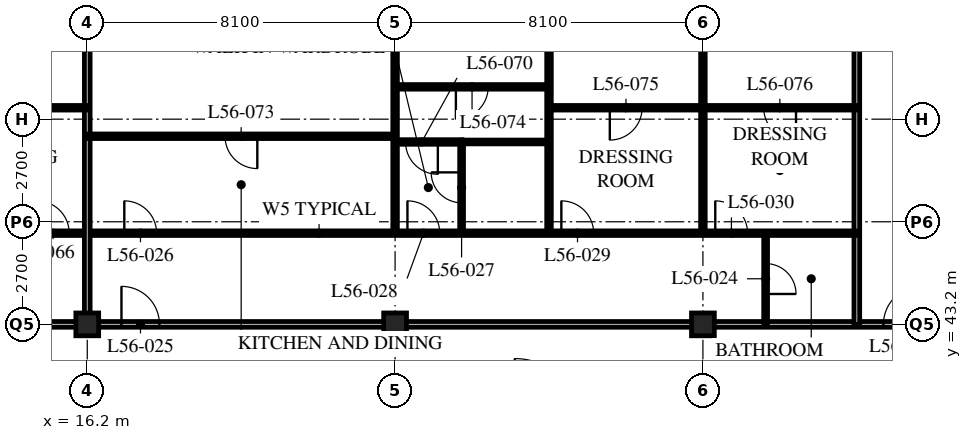
"""IFC4 building model, lengths in metres.
Left out: names, types, materials, properties, quantities, classifications, styles, units other than length and angle.
Written with IfcOpenShell. Run it as: python <this file> out.ifc"""

import sys

from ifc_helpers import new_model, si_unit, direction, frame, frame_2d, origin, origin_2d, place, context, subcontext, project, spatial, rectangle, hollow_rectangle, extrude, element, fill, save


model = new_model("IFC4")
c1 = context("Model", 3, precision=1e-05, world=origin(), true_north=direction((0.0, 1.0)))
c2 = subcontext(c1, "Body", "Model", "MODEL_VIEW")
j1 = project(units=[si_unit("LENGTHUNIT", "METRE"), si_unit("PLANEANGLEUNIT", "RADIAN")], contexts=[c1])
p1 = place(None, origin())
s1 = spatial("IfcSite", under=j1, at=p1, CompositionType="ELEMENT")
p2 = place(p1, origin())
s2 = spatial("IfcBuilding", under=s1, at=p2, CompositionType="ELEMENT")
p3 = place(p2, frame((0.0, 0.0, 217.2)))
s3 = spatial("IfcBuildingStorey", under=s2, at=p3, CompositionType="ELEMENT", Elevation=217.2)
for number, where, z_axis, x_axis in (
    (1, (16.2, 43.2, 0.0), (0.0, 0.0, 1.0), (1.0, 0.0, 0.0)),
    (2, (24.3, 43.2, 0.0), (0.0, 0.0, 1.0), (1.0, 0.0, 0.0)),
    (3, (32.4, 43.2, 0.0), (0.0, 0.0, 1.0), (1.0, 0.0, 0.0)),
):
    element("IfcColumn", number, at=place(p3, frame(where, z_axis=z_axis, x_axis=x_axis)), inside=s3, PredefinedType="COLUMN", context=c2, shape_type="SweptSolid", body=[
        extrude(hollow_rectangle(XDim=0.6, YDim=0.6, WallThickness=0.05, at=origin_2d()), origin(), (0.0, 0.0, 1.0), 3.6),
    ])
p4 = place(p3, frame((12.15, 43.2, 0.0), z_axis=(0.0, 0.0, 1.0), x_axis=(1.0, 0.0, 0.0)))
e4 = element("IfcWall", 4, at=p4, inside=s3, PredefinedType="PARTITIONING", context=c2, shape_type="SweptSolid", body=[
    extrude(rectangle(XDim=36.45, YDim=0.15, at=frame_2d((18.225, 0.0))), origin(), (0.0, 0.0, 1.0), 2.778),
])
p5 = place(p4, frame((4.95, 0.0, 0.0)))
e5 = element("IfcOpeningElement", 5, at=p5, cuts=e4, PredefinedType="OPENING", context=c2, shape_type="SweptSolid", body=[
    extrude(rectangle(XDim=1.0, YDim=2.1, at=frame_2d((0.5, 1.05))), frame((0.0, 0.085, 0.0), z_axis=(0.0, -1.0, 0.0), x_axis=(1.0, 0.0, 0.0)), (0.0, 0.0, 1.0), 0.17),
])
p6 = place(p4, frame((25.0, 0.0, 0.0)))
e6 = element("IfcOpeningElement", 6, at=p6, cuts=e4, PredefinedType="OPENING", context=c2, shape_type="SweptSolid", body=[
    extrude(rectangle(XDim=1.0, YDim=2.1, at=frame_2d((0.5, 1.05))), frame((0.0, 0.085, 0.0), z_axis=(0.0, -1.0, 0.0), x_axis=(1.0, 0.0, 0.0)), (0.0, 0.0, 1.0), 0.17),
])
p7 = place(p4, frame((30.7, 0.0, 0.0)))
e7 = element("IfcOpeningElement", 7, at=p7, cuts=e4, PredefinedType="OPENING", context=c2, shape_type="SweptSolid", body=[
    extrude(rectangle(XDim=1.0, YDim=2.1, at=frame_2d((0.5, 1.05))), frame((0.0, 0.085, 0.0), z_axis=(0.0, -1.0, 0.0), x_axis=(1.0, 0.0, 0.0)), (0.0, 0.0, 1.0), 0.17),
])
p8 = place(p4, frame((33.925, 0.0, 0.0)))
e8 = element("IfcOpeningElement", 8, at=p8, cuts=e4, PredefinedType="OPENING", context=c2, shape_type="SweptSolid", body=[
    extrude(rectangle(XDim=1.0, YDim=2.1, at=frame_2d((0.5, 1.05))), frame((0.0, 0.085, 0.0), z_axis=(0.0, -1.0, 0.0), x_axis=(1.0, 0.0, 0.0)), (0.0, 0.0, 1.0), 0.17),
])
p9 = place(p4, frame((1.525, 0.0, 0.0)))
e9 = element("IfcOpeningElement", 9, at=p9, cuts=e4, PredefinedType="OPENING", context=c2, shape_type="SweptSolid", body=[
    extrude(rectangle(XDim=1.0, YDim=2.1, at=frame_2d((0.5, 1.05))), frame((0.0, 0.085, 0.0), z_axis=(0.0, -1.0, 0.0), x_axis=(1.0, 0.0, 0.0)), (0.0, 0.0, 1.0), 0.17),
])
p10 = place(p3, frame((34.05, 43.2, 0.0), z_axis=(0.0, 0.0, 1.0), x_axis=(0.0, 1.0, 0.0)))
e10 = element("IfcWall", 10, at=p10, inside=s3, PredefinedType="PARTITIONING", context=c2, shape_type="SweptSolid", body=[
    extrude(rectangle(XDim=2.4, YDim=0.1, at=frame_2d((1.2, 0.0))), origin(), (0.0, 0.0, 1.0), 3.39),
])
p11 = place(p10, frame((0.8, 0.0, 0.0)))
e11 = element("IfcOpeningElement", 11, at=p11, cuts=e10, PredefinedType="OPENING", context=c2, shape_type="SweptSolid", body=[
    extrude(rectangle(XDim=0.8, YDim=2.1, at=frame_2d((0.4, 1.05))), frame((0.0, 0.06, 0.0), z_axis=(0.0, -1.0, 0.0), x_axis=(1.0, 0.0, 0.0)), (0.0, 0.0, 1.0), 0.12),
])
p12 = place(p3, frame((26.05, 45.6, 0.0), z_axis=(0.0, 0.0, 1.0), x_axis=(0.0, 1.0, 0.0)))
e12 = element("IfcWall", 12, at=p12, inside=s3, PredefinedType="PARTITIONING", context=c2, shape_type="SweptSolid", body=[
    extrude(rectangle(XDim=2.4, YDim=0.1, at=frame_2d((1.2, 0.0))), origin(), (0.0, 0.0, 1.0), 3.39),
])
p13 = place(p12, frame((0.8, 0.0, 0.0)))
e13 = element("IfcOpeningElement", 13, at=p13, cuts=e12, PredefinedType="OPENING", context=c2, shape_type="SweptSolid", body=[
    extrude(rectangle(XDim=0.8, YDim=2.1, at=frame_2d((0.4, 1.05))), frame((0.0, 0.06, 0.0), z_axis=(0.0, -1.0, 0.0), x_axis=(1.0, 0.0, 0.0)), (0.0, 0.0, 1.0), 0.12),
])
p14 = place(p3, frame((26.05, 48.0, 0.0), z_axis=(0.0, 0.0, 1.0), x_axis=(1.0, 0.0, 0.0)))
e14 = element("IfcWall", 14, at=p14, inside=s3, PredefinedType="PARTITIONING", context=c2, shape_type="SweptSolid", body=[
    extrude(rectangle(XDim=2.3, YDim=0.1, at=frame_2d((1.15, 0.0))), origin(), (0.0, 0.0, 1.0), 3.39),
])
p15 = place(p3, frame((24.3, 45.6, 0.0), z_axis=(0.0, 0.0, 1.0), x_axis=(0.0, 1.0, 0.0)))
e15 = element("IfcWall", 15, at=p15, inside=s3, PredefinedType="PARTITIONING", context=c2, shape_type="SweptSolid", body=[
    extrude(rectangle(XDim=13.5, YDim=0.12, at=frame_2d((6.75, 0.0))), origin(), (0.0, 0.0, 1.0), 2.778),
])
p16 = place(p3, frame((28.35, 45.6, 0.0), z_axis=(0.0, 0.0, 1.0), x_axis=(0.0, 1.0, 0.0)))
e16 = element("IfcWall", 16, at=p16, inside=s3, PredefinedType="PARTITIONING", context=c2, shape_type="SweptSolid", body=[
    extrude(rectangle(XDim=13.5, YDim=0.12, at=frame_2d((6.75, 0.0))), origin(), (0.0, 0.0, 1.0), 3.39),
])
p17 = place(p3, frame((32.4, 45.6, 0.0), z_axis=(0.0, 0.0, 1.0), x_axis=(0.0, 1.0, 0.0)))
e17 = element("IfcWall", 17, at=p17, inside=s3, PredefinedType="PARTITIONING", context=c2, shape_type="SweptSolid", body=[
    extrude(rectangle(XDim=13.5, YDim=0.12, at=frame_2d((6.75, 0.0))), origin(), (0.0, 0.0, 1.0), 2.778),
])
p18 = place(p3, frame((36.45, 43.2, 0.0), z_axis=(0.0, 0.0, 1.0), x_axis=(0.0, 1.0, 0.0)))
e18 = element("IfcWall", 18, at=p18, inside=s3, PredefinedType="PARTITIONING", context=c2, shape_type="SweptSolid", body=[
    extrude(rectangle(XDim=15.9, YDim=0.15, at=frame_2d((7.95, 0.0))), origin(), (0.0, 0.0, 1.0), 3.39),
])
p19 = place(p3, frame((8.15, 45.6, 0.0), z_axis=(0.0, 0.0, 1.0), x_axis=(1.0, 0.0, 0.0)))
e19 = element("IfcWall", 19, at=p19, inside=s3, PredefinedType="PARTITIONING", context=c2, shape_type="SweptSolid", body=[
    extrude(rectangle(XDim=28.3, YDim=0.12, at=frame_2d((14.15, 0.0))), origin(), (0.0, 0.0, 1.0), 3.39),
])
p20 = place(p19, frame((9.025, 0.0, 0.0)))
e20 = element("IfcOpeningElement", 20, at=p20, cuts=e19, PredefinedType="OPENING", context=c2, shape_type="SweptSolid", body=[
    extrude(rectangle(XDim=0.85, YDim=2.1, at=frame_2d((0.425, 1.05))), frame((0.0, 0.07, 0.0), z_axis=(0.0, -1.0, 0.0), x_axis=(1.0, 0.0, 0.0)), (0.0, 0.0, 1.0), 0.14),
])
p21 = place(p19, frame((16.475, 0.0, 0.0)))
e21 = element("IfcOpeningElement", 21, at=p21, cuts=e19, PredefinedType="OPENING", context=c2, shape_type="SweptSolid", body=[
    extrude(rectangle(XDim=0.85, YDim=2.1, at=frame_2d((0.425, 1.05))), frame((0.0, 0.07, 0.0), z_axis=(0.0, -1.0, 0.0), x_axis=(1.0, 0.0, 0.0)), (0.0, 0.0, 1.0), 0.14),
])
p22 = place(p19, frame((20.525, 0.0, 0.0)))
e22 = element("IfcOpeningElement", 22, at=p22, cuts=e19, PredefinedType="OPENING", context=c2, shape_type="SweptSolid", body=[
    extrude(rectangle(XDim=0.85, YDim=2.1, at=frame_2d((0.425, 1.05))), frame((0.0, 0.07, 0.0), z_axis=(0.0, -1.0, 0.0), x_axis=(1.0, 0.0, 0.0)), (0.0, 0.0, 1.0), 0.14),
])
p23 = place(p19, frame((24.575, 0.0, 0.0)))
e23 = element("IfcOpeningElement", 23, at=p23, cuts=e19, PredefinedType="OPENING", context=c2, shape_type="SweptSolid", body=[
    extrude(rectangle(XDim=0.85, YDim=2.1, at=frame_2d((0.425, 1.05))), frame((0.0, 0.07, 0.0), z_axis=(0.0, -1.0, 0.0), x_axis=(1.0, 0.0, 0.0)), (0.0, 0.0, 1.0), 0.14),
])
p24 = place(p19, frame((6.725, 0.0, 0.0)))
e24 = element("IfcOpeningElement", 24, at=p24, cuts=e19, PredefinedType="OPENING", context=c2, shape_type="SweptSolid", body=[
    extrude(rectangle(XDim=0.85, YDim=2.1, at=frame_2d((0.425, 1.05))), frame((0.0, 0.07, 0.0), z_axis=(0.0, -1.0, 0.0), x_axis=(1.0, 0.0, 0.0)), (0.0, 0.0, 1.0), 0.14),
])
p25 = place(p19, frame((2.875, 0.0, 0.0)))
e25 = element("IfcOpeningElement", 25, at=p25, cuts=e19, PredefinedType="OPENING", context=c2, shape_type="SweptSolid", body=[
    extrude(rectangle(XDim=0.85, YDim=2.1, at=frame_2d((0.425, 1.05))), frame((0.0, 0.07, 0.0), z_axis=(0.0, -1.0, 0.0), x_axis=(1.0, 0.0, 0.0)), (0.0, 0.0, 1.0), 0.14),
])
p26 = place(p3, frame((16.2, 43.2, 0.0), z_axis=(0.0, 0.0, 1.0), x_axis=(0.0, 1.0, 0.0)))
e26 = element("IfcWall", 26, at=p26, inside=s3, PredefinedType="PARTITIONING", context=c2, shape_type="SweptSolid", body=[
    extrude(rectangle(XDim=15.9, YDim=0.15, at=frame_2d((7.95, 0.0))), origin(), (0.0, 0.0, 1.0), 2.778),
])
p27 = place(p3, frame((24.3, 48.0, 0.0), z_axis=(0.0, 0.0, 1.0), x_axis=(1.0, 0.0, 0.0)))
e27 = element("IfcWall", 27, at=p27, inside=s3, PredefinedType="PARTITIONING", context=c2, shape_type="SweptSolid", body=[
    extrude(rectangle(XDim=1.76, YDim=0.12, at=frame_2d((0.88, 0.0))), origin(), (0.0, 0.0, 1.0), 3.39),
])
p28 = place(p27, frame((0.275, 0.0, 0.0)))
e28 = element("IfcOpeningElement", 28, at=p28, cuts=e27, PredefinedType="OPENING", context=c2, shape_type="SweptSolid", body=[
    extrude(rectangle(XDim=0.85, YDim=2.1, at=frame_2d((0.425, 1.05))), frame((0.0, 0.07, 0.0), z_axis=(0.0, -1.0, 0.0), x_axis=(1.0, 0.0, 0.0)), (0.0, 0.0, 1.0), 0.14),
])
p29 = place(p3, frame((16.2, 48.15, 0.0), z_axis=(0.0, 0.0, 1.0), x_axis=(1.0, 0.0, 0.0)))
e29 = element("IfcWall", 29, at=p29, inside=s3, PredefinedType="PARTITIONING", context=c2, shape_type="SweptSolid", body=[
    extrude(rectangle(XDim=8.1, YDim=0.12, at=frame_2d((4.05, 0.0))), origin(), (0.0, 0.0, 1.0), 3.39),
])
p30 = place(p29, frame((3.625, 0.0, 0.0)))
e30 = element("IfcOpeningElement", 30, at=p30, cuts=e29, PredefinedType="OPENING", context=c2, shape_type="SweptSolid", body=[
    extrude(rectangle(XDim=0.85, YDim=2.1, at=frame_2d((0.425, 1.05))), frame((0.0, 0.07, 0.0), z_axis=(0.0, -1.0, 0.0), x_axis=(1.0, 0.0, 0.0)), (0.0, 0.0, 1.0), 0.14),
])
p31 = place(p3, frame((24.3, 49.45, 0.0), z_axis=(0.0, 0.0, 1.0), x_axis=(1.0, 0.0, 0.0)))
e31 = element("IfcWall", 31, at=p31, inside=s3, PredefinedType="PARTITIONING", context=c2, shape_type="SweptSolid", body=[
    extrude(rectangle(XDim=4.05, YDim=0.12, at=frame_2d((2.025, 0.0))), origin(), (0.0, 0.0, 1.0), 3.39),
])
p32 = place(p31, frame((1.6, 0.0, 0.0)))
e32 = element("IfcOpeningElement", 32, at=p32, cuts=e31, PredefinedType="OPENING", context=c2, shape_type="SweptSolid", body=[
    extrude(rectangle(XDim=0.85, YDim=2.1, at=frame_2d((0.425, 1.05))), frame((0.0, 0.07, 0.0), z_axis=(0.0, -1.0, 0.0), x_axis=(1.0, 0.0, 0.0)), (0.0, 0.0, 1.0), 0.14),
])
p33 = place(p3, frame((28.35, 48.9, 0.0), z_axis=(0.0, 0.0, 1.0), x_axis=(1.0, 0.0, 0.0)))
e33 = element("IfcWall", 33, at=p33, inside=s3, PredefinedType="PARTITIONING", context=c2, shape_type="SweptSolid", body=[
    extrude(rectangle(XDim=8.1, YDim=0.12, at=frame_2d((4.05, 0.0))), origin(), (0.0, 0.0, 1.0), 3.39),
])
p34 = place(p33, frame((1.6, 0.0, 0.0)))
e34 = element("IfcOpeningElement", 34, at=p34, cuts=e33, PredefinedType="OPENING", context=c2, shape_type="SweptSolid", body=[
    extrude(rectangle(XDim=0.85, YDim=2.1, at=frame_2d((0.425, 1.05))), frame((0.0, 0.07, 0.0), z_axis=(0.0, -1.0, 0.0), x_axis=(1.0, 0.0, 0.0)), (0.0, 0.0, 1.0), 0.14),
])
p35 = place(p33, frame((5.65, 0.0, 0.0)))
e35 = element("IfcOpeningElement", 35, at=p35, cuts=e33, PredefinedType="OPENING", context=c2, shape_type="SweptSolid", body=[
    extrude(rectangle(XDim=0.85, YDim=2.1, at=frame_2d((0.425, 1.05))), frame((0.0, 0.07, 0.0), z_axis=(0.0, -1.0, 0.0), x_axis=(1.0, 0.0, 0.0)), (0.0, 0.0, 1.0), 0.14),
])
p36 = place(p3, frame((12.15, 48.9, 0.0), z_axis=(0.0, 0.0, 1.0), x_axis=(1.0, 0.0, 0.0)))
e36 = element("IfcWall", 36, at=p36, inside=s3, PredefinedType="PARTITIONING", context=c2, shape_type="SweptSolid", body=[
    extrude(rectangle(XDim=4.05, YDim=0.12, at=frame_2d((2.025, 0.0))), origin(), (0.0, 0.0, 1.0), 3.39),
])
p37 = place(p36, frame((1.6, 0.0, 0.0)))
e37 = element("IfcOpeningElement", 37, at=p37, cuts=e36, PredefinedType="OPENING", context=c2, shape_type="SweptSolid", body=[
    extrude(rectangle(XDim=0.85, YDim=2.1, at=frame_2d((0.425, 1.05))), frame((0.0, 0.07, 0.0), z_axis=(0.0, -1.0, 0.0), x_axis=(1.0, 0.0, 0.0)), (0.0, 0.0, 1.0), 0.14),
])
p38 = place(p11, origin())
e38 = element("IfcDoor", 38, at=p38, inside=s3, OperationType="SINGLE_SWING_RIGHT", PredefinedType="DOOR", context=c2, shape_type="SweptSolid", body=[
    extrude(rectangle(XDim=0.8, YDim=2.1, at=frame_2d((0.4, 1.05))), frame((0.0, 0.025, 0.0), z_axis=(0.0, -1.0, 0.0), x_axis=(1.0, 0.0, 0.0)), (0.0, 0.0, 1.0), 0.05),
])
fill(e11, e38)
p39 = place(p5, origin())
e39 = element("IfcDoor", 39, at=p39, inside=s3, OperationType="SINGLE_SWING_LEFT", PredefinedType="DOOR", context=c2, shape_type="SweptSolid", body=[
    extrude(rectangle(XDim=1.0, YDim=2.1, at=frame_2d((0.5, 1.05))), frame((0.0, 0.025, 0.0), z_axis=(0.0, -1.0, 0.0), x_axis=(1.0, 0.0, 0.0)), (0.0, 0.0, 1.0), 0.05),
])
fill(e5, e39)
p40 = place(p20, origin())
e40 = element("IfcDoor", 40, at=p40, inside=s3, OperationType="SINGLE_SWING_LEFT", PredefinedType="DOOR", context=c2, shape_type="SweptSolid", body=[
    extrude(rectangle(XDim=0.85, YDim=2.1, at=frame_2d((0.425, 1.05))), frame((0.0, 0.025, 0.0), z_axis=(0.0, -1.0, 0.0), x_axis=(1.0, 0.0, 0.0)), (0.0, 0.0, 1.0), 0.05),
])
fill(e20, e40)
p41 = place(p13, origin())
e41 = element("IfcDoor", 41, at=p41, inside=s3, OperationType="SINGLE_SWING_RIGHT", PredefinedType="DOOR", context=c2, shape_type="SweptSolid", body=[
    extrude(rectangle(XDim=0.8, YDim=2.1, at=frame_2d((0.4, 1.05))), frame((0.0, 0.025, 0.0), z_axis=(0.0, -1.0, 0.0), x_axis=(1.0, 0.0, 0.0)), (0.0, 0.0, 1.0), 0.05),
])
fill(e13, e41)
p42 = place(p21, origin())
e42 = element("IfcDoor", 42, at=p42, inside=s3, OperationType="SINGLE_SWING_LEFT", PredefinedType="DOOR", context=c2, shape_type="SweptSolid", body=[
    extrude(rectangle(XDim=0.85, YDim=2.1, at=frame_2d((0.425, 1.05))), frame((0.0, 0.025, 0.0), z_axis=(0.0, -1.0, 0.0), x_axis=(1.0, 0.0, 0.0)), (0.0, 0.0, 1.0), 0.05),
])
fill(e21, e42)
p43 = place(p22, origin())
e43 = element("IfcDoor", 43, at=p43, inside=s3, OperationType="SINGLE_SWING_LEFT", PredefinedType="DOOR", context=c2, shape_type="SweptSolid", body=[
    extrude(rectangle(XDim=0.85, YDim=2.1, at=frame_2d((0.425, 1.05))), frame((0.0, 0.025, 0.0), z_axis=(0.0, -1.0, 0.0), x_axis=(1.0, 0.0, 0.0)), (0.0, 0.0, 1.0), 0.05),
])
fill(e22, e43)
p44 = place(p23, origin())
e44 = element("IfcDoor", 44, at=p44, inside=s3, OperationType="SINGLE_SWING_LEFT", PredefinedType="DOOR", context=c2, shape_type="SweptSolid", body=[
    extrude(rectangle(XDim=0.85, YDim=2.1, at=frame_2d((0.425, 1.05))), frame((0.0, 0.025, 0.0), z_axis=(0.0, -1.0, 0.0), x_axis=(1.0, 0.0, 0.0)), (0.0, 0.0, 1.0), 0.05),
])
fill(e23, e44)
p45 = place(p6, origin())
e45 = element("IfcDoor", 45, at=p45, inside=s3, OperationType="SINGLE_SWING_RIGHT", PredefinedType="DOOR", context=c2, shape_type="SweptSolid", body=[
    extrude(rectangle(XDim=1.0, YDim=2.1, at=frame_2d((0.5, 1.05))), frame((0.0, 0.025, 0.0), z_axis=(0.0, -1.0, 0.0), x_axis=(1.0, 0.0, 0.0)), (0.0, 0.0, 1.0), 0.05),
])
fill(e6, e45)
p46 = place(p24, origin())
e46 = element("IfcDoor", 46, at=p46, inside=s3, OperationType="SINGLE_SWING_LEFT", PredefinedType="DOOR", context=c2, shape_type="SweptSolid", body=[
    extrude(rectangle(XDim=0.85, YDim=2.1, at=frame_2d((0.425, 1.05))), frame((0.0, 0.025, 0.0), z_axis=(0.0, -1.0, 0.0), x_axis=(1.0, 0.0, 0.0)), (0.0, 0.0, 1.0), 0.05),
])
fill(e24, e46)
p47 = place(p28, origin())
e47 = element("IfcDoor", 47, at=p47, inside=s3, OperationType="SINGLE_SWING_LEFT", PredefinedType="DOOR", context=c2, shape_type="SweptSolid", body=[
    extrude(rectangle(XDim=0.85, YDim=2.1, at=frame_2d((0.425, 1.05))), frame((0.0, 0.025, 0.0), z_axis=(0.0, -1.0, 0.0), x_axis=(1.0, 0.0, 0.0)), (0.0, 0.0, 1.0), 0.05),
])
fill(e28, e47)
p48 = place(p30, origin())
e48 = element("IfcDoor", 48, at=p48, inside=s3, OperationType="SINGLE_SWING_LEFT", PredefinedType="DOOR", context=c2, shape_type="SweptSolid", body=[
    extrude(rectangle(XDim=0.85, YDim=2.1, at=frame_2d((0.425, 1.05))), frame((0.0, 0.025, 0.0), z_axis=(0.0, -1.0, 0.0), x_axis=(1.0, 0.0, 0.0)), (0.0, 0.0, 1.0), 0.05),
])
fill(e30, e48)
p49 = place(p32, origin())
e49 = element("IfcDoor", 49, at=p49, inside=s3, OperationType="SINGLE_SWING_RIGHT", PredefinedType="DOOR", context=c2, shape_type="SweptSolid", body=[
    extrude(rectangle(XDim=0.85, YDim=2.1, at=frame_2d((0.425, 1.05))), frame((0.0, 0.025, 0.0), z_axis=(0.0, -1.0, 0.0), x_axis=(1.0, 0.0, 0.0)), (0.0, 0.0, 1.0), 0.05),
])
fill(e32, e49)
p50 = place(p34, origin())
e50 = element("IfcDoor", 50, at=p50, inside=s3, OperationType="SINGLE_SWING_RIGHT", PredefinedType="DOOR", context=c2, shape_type="SweptSolid", body=[
    extrude(rectangle(XDim=0.85, YDim=2.1, at=frame_2d((0.425, 1.05))), frame((0.0, 0.025, 0.0), z_axis=(0.0, -1.0, 0.0), x_axis=(1.0, 0.0, 0.0)), (0.0, 0.0, 1.0), 0.05),
])
fill(e34, e50)
p51 = place(p35, origin())
e51 = element("IfcDoor", 51, at=p51, inside=s3, OperationType="SINGLE_SWING_LEFT", PredefinedType="DOOR", context=c2, shape_type="SweptSolid", body=[
    extrude(rectangle(XDim=0.85, YDim=2.1, at=frame_2d((0.425, 1.05))), frame((0.0, 0.025, 0.0), z_axis=(0.0, -1.0, 0.0), x_axis=(1.0, 0.0, 0.0)), (0.0, 0.0, 1.0), 0.05),
])
fill(e35, e51)
save(model, sys.argv[1])
